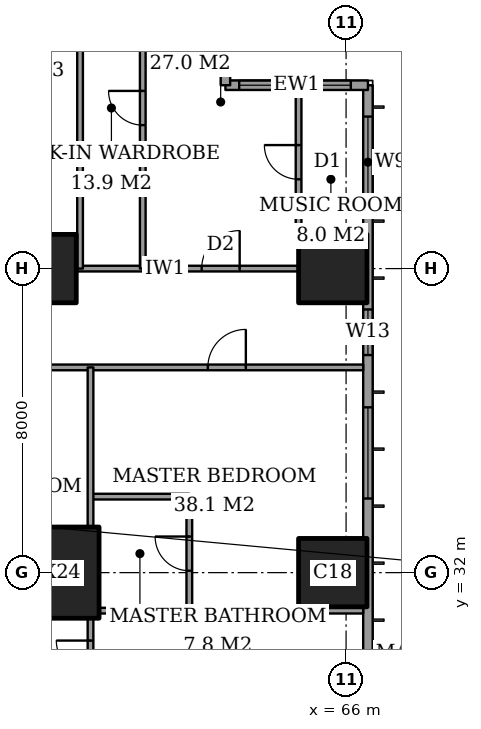
"""IFC4 building model, lengths in metres.
Left out: names, types, materials, properties, quantities, classifications, styles, units other than length and angle.
Written with IfcOpenShell. Run it as: python <this file> out.ifc"""

import sys

from ifc_helpers import new_model, si_unit, direction, frame, frame_2d, origin, origin_2d, place, context, subcontext, project, spatial, rectangle, extrude, element, fill, save


model = new_model("IFC4")
c1 = context("Model", 3, precision=1e-05, world=origin(), true_north=direction((0.0, 1.0)))
c2 = subcontext(c1, "Body", "Model", "MODEL_VIEW")
j1 = project(units=[si_unit("LENGTHUNIT", "METRE"), si_unit("PLANEANGLEUNIT", "RADIAN")], contexts=[c1])
p1 = place(None, origin())
s1 = spatial("IfcSite", under=j1, at=p1, CompositionType="ELEMENT")
p2 = place(p1, origin())
s2 = spatial("IfcBuilding", under=s1, at=p2, CompositionType="ELEMENT")
p3 = place(p2, frame((0.0, 0.0, 185.8)))
s3 = spatial("IfcBuildingStorey", under=s2, at=p3, CompositionType="ELEMENT", Elevation=185.8)
p4 = place(p3, frame((58.0, 32.0, 0.0), z_axis=(0.0, 0.0, 1.0), x_axis=(1.0, 0.0, 0.0)))
e1 = element("IfcColumn", 1, at=p4, inside=s3, PredefinedType="COLUMN", context=c2, shape_type="SweptSolid", body=[
    extrude(rectangle(XDim=3.0, YDim=2.4, at=origin_2d()), origin(), (0.0, 0.0, 1.0), 3.6),
])
for number, where, z_axis, x_axis in (
    (2, (58.0, 40.0, 0.0), (0.0, 0.0, 1.0), (1.0, 0.0, 0.0)),
    (3, (65.65, 32.0, 0.0), (0.0, 0.0, 1.0), (1.0, 0.0, 0.0)),
    (4, (65.65, 40.0, 0.0), (0.0, 0.0, 1.0), (1.0, 0.0, 0.0)),
):
    element("IfcColumn", number, at=place(p3, frame(where, z_axis=z_axis, x_axis=x_axis)), inside=s3, PredefinedType="COLUMN", context=c2, shape_type="SweptSolid", body=[
        extrude(rectangle(XDim=1.8, YDim=1.8, at=origin_2d()), origin(), (0.0, 0.0, 1.0), 3.6),
    ])
p5 = place(p3, frame((66.575, 3.175, 0.0), z_axis=(0.0, 0.0, 1.0), x_axis=(0.0, 1.0, 0.0)))
e5 = element("IfcWall", 5, at=p5, inside=s3, PredefinedType="SOLIDWALL", context=c2, shape_type="SweptSolid", body=[
    extrude(rectangle(XDim=41.65, YDim=0.25, at=frame_2d((20.825, 0.0))), origin(), (0.0, 0.0, 1.0), 3.6),
])
p6 = place(p5, frame((0.825, 0.0, 0.2)))
e6 = element("IfcOpeningElement", 6, at=p6, cuts=e5, PredefinedType="OPENING", context=c2, shape_type="SweptSolid", body=[
    extrude(rectangle(XDim=2.4, YDim=2.4, at=frame_2d((1.2, 1.2))), frame((0.0, 0.135, 0.0), z_axis=(0.0, -1.0, 0.0), x_axis=(1.0, 0.0, 0.0)), (0.0, 0.0, 1.0), 0.27),
])
p7 = place(p5, frame((6.6, 0.0, 0.2)))
e7 = element("IfcOpeningElement", 7, at=p7, cuts=e5, PredefinedType="OPENING", context=c2, shape_type="SweptSolid", body=[
    extrude(rectangle(XDim=1.2, YDim=2.4, at=frame_2d((0.6, 1.2))), frame((0.0, 0.135, 0.0), z_axis=(0.0, -1.0, 0.0), x_axis=(1.0, 0.0, 0.0)), (0.0, 0.0, 1.0), 0.27),
])
p8 = place(p5, frame((8.775, 0.0, 0.2)))
e8 = element("IfcOpeningElement", 8, at=p8, cuts=e5, PredefinedType="OPENING", context=c2, shape_type="SweptSolid", body=[
    extrude(rectangle(XDim=2.4, YDim=2.4, at=frame_2d((1.2, 1.2))), frame((0.0, 0.135, 0.0), z_axis=(0.0, -1.0, 0.0), x_axis=(1.0, 0.0, 0.0)), (0.0, 0.0, 1.0), 0.27),
])
p9 = place(p5, frame((15.675, 0.0, 0.2)))
e9 = element("IfcOpeningElement", 9, at=p9, cuts=e5, PredefinedType="OPENING", context=c2, shape_type="SweptSolid", body=[
    extrude(rectangle(XDim=2.4, YDim=2.4, at=frame_2d((1.2, 1.2))), frame((0.0, 0.135, 0.0), z_axis=(0.0, -1.0, 0.0), x_axis=(1.0, 0.0, 0.0)), (0.0, 0.0, 1.0), 0.27),
])
p10 = place(p5, frame((23.575, 0.0, 0.2)))
e10 = element("IfcOpeningElement", 10, at=p10, cuts=e5, PredefinedType="OPENING", context=c2, shape_type="SweptSolid", body=[
    extrude(rectangle(XDim=2.4, YDim=2.4, at=frame_2d((1.2, 1.2))), frame((0.0, 0.135, 0.0), z_axis=(0.0, -1.0, 0.0), x_axis=(1.0, 0.0, 0.0)), (0.0, 0.0, 1.0), 0.27),
])
p11 = place(p5, frame((30.775, 0.0, 0.2)))
e11 = element("IfcOpeningElement", 11, at=p11, cuts=e5, PredefinedType="OPENING", context=c2, shape_type="SweptSolid", body=[
    extrude(rectangle(XDim=2.4, YDim=2.4, at=frame_2d((1.2, 1.2))), frame((0.0, 0.135, 0.0), z_axis=(0.0, -1.0, 0.0), x_axis=(1.0, 0.0, 0.0)), (0.0, 0.0, 1.0), 0.27),
])
p12 = place(p5, frame((34.55, 0.0, 0.2)))
e12 = element("IfcOpeningElement", 12, at=p12, cuts=e5, PredefinedType="OPENING", context=c2, shape_type="SweptSolid", body=[
    extrude(rectangle(XDim=1.2, YDim=2.4, at=frame_2d((0.6, 1.2))), frame((0.0, 0.135, 0.0), z_axis=(0.0, -1.0, 0.0), x_axis=(1.0, 0.0, 0.0)), (0.0, 0.0, 1.0), 0.27),
])
p13 = place(p5, frame((38.425, 0.0, 0.2)))
e13 = element("IfcOpeningElement", 13, at=p13, cuts=e5, PredefinedType="OPENING", context=c2, shape_type="SweptSolid", body=[
    extrude(rectangle(XDim=2.4, YDim=2.4, at=frame_2d((1.2, 1.2))), frame((0.0, 0.135, 0.0), z_axis=(0.0, -1.0, 0.0), x_axis=(1.0, 0.0, 0.0)), (0.0, 0.0, 1.0), 0.27),
])
p14 = place(p3, frame((66.575, 44.825, 0.0), z_axis=(0.0, 0.0, 1.0), x_axis=(-1.0, 0.0, 0.0)))
e14 = element("IfcWall", 14, at=p14, inside=s3, PredefinedType="SOLIDWALL", context=c2, shape_type="SweptSolid", body=[
    extrude(rectangle(XDim=3.75, YDim=0.25, at=frame_2d((1.875, 0.0))), origin(), (0.0, 0.0, 1.0), 3.6),
])
p15 = place(p14, frame((0.45, 0.0, 0.2)))
e15 = element("IfcOpeningElement", 15, at=p15, cuts=e14, PredefinedType="OPENING", context=c2, shape_type="SweptSolid", body=[
    extrude(rectangle(XDim=1.2, YDim=2.4, at=frame_2d((0.6, 1.2))), frame((0.0, 0.135, 0.0), z_axis=(0.0, -1.0, 0.0), x_axis=(1.0, 0.0, 0.0)), (0.0, 0.0, 1.0), 0.27),
])
p16 = place(p14, frame((2.188, 0.0, 0.2)))
e16 = element("IfcOpeningElement", 16, at=p16, cuts=e14, PredefinedType="OPENING", context=c2, shape_type="SweptSolid", body=[
    extrude(rectangle(XDim=1.2, YDim=2.4, at=frame_2d((0.6, 1.2))), frame((0.0, 0.135, 0.0), z_axis=(0.0, -1.0, 0.0), x_axis=(1.0, 0.0, 0.0)), (0.0, 0.0, 1.0), 0.27),
])
p17 = place(p3, frame((62.825, 44.825, 0.0), z_axis=(0.0, 0.0, 1.0), x_axis=(0.0, 1.0, 0.0)))
e17 = element("IfcWall", 17, at=p17, inside=s3, PredefinedType="SOLIDWALL", context=c2, shape_type="SweptSolid", body=[
    extrude(rectangle(XDim=3.75, YDim=0.25, at=frame_2d((1.875, 0.0))), origin(), (0.0, 0.0, 1.0), 3.6),
])
p18 = place(p17, frame((0.613, 0.0, 0.2)))
e18 = element("IfcOpeningElement", 18, at=p18, cuts=e17, PredefinedType="OPENING", context=c2, shape_type="SweptSolid", body=[
    extrude(rectangle(XDim=2.4, YDim=2.4, at=frame_2d((1.2, 1.2))), frame((0.0, 0.135, 0.0), z_axis=(0.0, -1.0, 0.0), x_axis=(1.0, 0.0, 0.0)), (0.0, 0.0, 1.0), 0.27),
])
p19 = place(p3, frame((59.5, 31.0, 0.0), z_axis=(0.0, 0.0, 1.0), x_axis=(1.0, 0.0, 0.0)))
e19 = element("IfcWall", 19, at=p19, inside=s3, PredefinedType="PARTITIONING", context=c2, shape_type="SweptSolid", body=[
    extrude(rectangle(XDim=6.95, YDim=0.15, at=frame_2d((3.475, 0.0))), origin(), (0.0, 0.0, 1.0), 3.35),
])
p20 = place(p3, frame((59.275, 34.0, 0.0), z_axis=(0.0, 0.0, 1.0), x_axis=(1.0, 0.0, 0.0)))
e20 = element("IfcWall", 20, at=p20, inside=s3, PredefinedType="PARTITIONING", context=c2, shape_type="SweptSolid", body=[
    extrude(rectangle(XDim=2.6, YDim=0.15, at=frame_2d((1.3, 0.0))), origin(), (0.0, 0.0, 1.0), 3.35),
])
p21 = place(p3, frame((41.439, 37.4, 0.0), z_axis=(0.0, 0.0, 1.0), x_axis=(1.0, 0.0, 0.0)))
e21 = element("IfcWall", 21, at=p21, inside=s3, PredefinedType="PARTITIONING", context=c2, shape_type="SweptSolid", body=[
    extrude(rectangle(XDim=25.011, YDim=0.15, at=frame_2d((12.505, 0.0))), origin(), (0.0, 0.0, 1.0), 3.35),
])
p22 = place(p21, frame((10.761, 0.0, 0.0)))
e22 = element("IfcOpeningElement", 22, at=p22, cuts=e21, PredefinedType="OPENING", context=c2, shape_type="SweptSolid", body=[
    extrude(rectangle(XDim=1.0, YDim=2.1, at=frame_2d((0.5, 1.05))), frame((0.0, 0.085, 0.0), z_axis=(0.0, -1.0, 0.0), x_axis=(1.0, 0.0, 0.0)), (0.0, 0.0, 1.0), 0.17),
])
p23 = place(p21, frame((20.924, 0.0, 0.0)))
e23 = element("IfcOpeningElement", 23, at=p23, cuts=e21, PredefinedType="OPENING", context=c2, shape_type="SweptSolid", body=[
    extrude(rectangle(XDim=1.0, YDim=2.1, at=frame_2d((0.5, 1.05))), frame((0.0, 0.085, 0.0), z_axis=(0.0, -1.0, 0.0), x_axis=(1.0, 0.0, 0.0)), (0.0, 0.0, 1.0), 0.17),
])
p24 = place(p21, frame((15.749, 0.0, 0.0)))
e24 = element("IfcOpeningElement", 24, at=p24, cuts=e21, PredefinedType="OPENING", context=c2, shape_type="SweptSolid", body=[
    extrude(rectangle(XDim=0.9, YDim=2.1, at=frame_2d((0.45, 1.05))), frame((0.0, 0.085, 0.0), z_axis=(0.0, -1.0, 0.0), x_axis=(1.0, 0.0, 0.0)), (0.0, 0.0, 1.0), 0.17),
])
p25 = place(p21, frame((12.961, 0.0, 0.0)))
e25 = element("IfcOpeningElement", 25, at=p25, cuts=e21, PredefinedType="OPENING", context=c2, shape_type="SweptSolid", body=[
    extrude(rectangle(XDim=1.0, YDim=2.1, at=frame_2d((0.5, 1.05))), frame((0.0, 0.085, 0.0), z_axis=(0.0, -1.0, 0.0), x_axis=(1.0, 0.0, 0.0)), (0.0, 0.0, 1.0), 0.17),
])
p26 = place(p21, frame((7.911, 0.0, 0.0)))
e26 = element("IfcOpeningElement", 26, at=p26, cuts=e21, PredefinedType="OPENING", context=c2, shape_type="SweptSolid", body=[
    extrude(rectangle(XDim=0.9, YDim=2.1, at=frame_2d((0.45, 1.05))), frame((0.0, 0.085, 0.0), z_axis=(0.0, -1.0, 0.0), x_axis=(1.0, 0.0, 0.0)), (0.0, 0.0, 1.0), 0.17),
])
p27 = place(p21, frame((2.836, 0.0, 0.0)))
e27 = element("IfcOpeningElement", 27, at=p27, cuts=e21, PredefinedType="OPENING", context=c2, shape_type="SweptSolid", body=[
    extrude(rectangle(XDim=1.0, YDim=2.1, at=frame_2d((0.5, 1.05))), frame((0.0, 0.085, 0.0), z_axis=(0.0, -1.0, 0.0), x_axis=(1.0, 0.0, 0.0)), (0.0, 0.0, 1.0), 0.17),
])
p28 = place(p3, frame((58.9, 40.0, 0.0), z_axis=(0.0, 0.0, 1.0), x_axis=(1.0, 0.0, 0.0)))
e28 = element("IfcWall", 28, at=p28, inside=s3, PredefinedType="PARTITIONING", context=c2, shape_type="SweptSolid", body=[
    extrude(rectangle(XDim=5.85, YDim=0.15, at=frame_2d((2.925, 0.0))), origin(), (0.0, 0.0, 1.0), 3.35),
])
p29 = place(p28, frame((3.3, 0.0, 0.0)))
e29 = element("IfcOpeningElement", 29, at=p29, cuts=e28, PredefinedType="OPENING", context=c2, shape_type="SweptSolid", body=[
    extrude(rectangle(XDim=1.0, YDim=2.1, at=frame_2d((0.5, 1.05))), frame((0.0, 0.085, 0.0), z_axis=(0.0, -1.0, 0.0), x_axis=(1.0, 0.0, 0.0)), (0.0, 0.0, 1.0), 0.17),
])
p30 = place(p3, frame((59.0, 40.0, 0.0), z_axis=(0.0, 0.0, 1.0), x_axis=(0.0, 1.0, 0.0)))
e30 = element("IfcWall", 30, at=p30, inside=s3, PredefinedType="PARTITIONING", context=c2, shape_type="SweptSolid", body=[
    extrude(rectangle(XDim=8.45, YDim=0.15, at=frame_2d((4.225, 0.0))), origin(), (0.0, 0.0, 1.0), 3.35),
])
p31 = place(p3, frame((59.275, 28.35, 0.0), z_axis=(0.0, 0.0, 1.0), x_axis=(0.0, 1.0, 0.0)))
e31 = element("IfcWall", 31, at=p31, inside=s3, PredefinedType="PARTITIONING", context=c2, shape_type="SweptSolid", body=[
    extrude(rectangle(XDim=2.45, YDim=0.15, at=frame_2d((1.225, 0.0))), origin(), (0.0, 0.0, 1.0), 3.35),
])
p32 = place(p31, frame((0.962, 0.0, 0.0)))
e32 = element("IfcOpeningElement", 32, at=p32, cuts=e31, PredefinedType="OPENING", context=c2, shape_type="SweptSolid", body=[
    extrude(rectangle(XDim=0.9, YDim=2.1, at=frame_2d((0.45, 1.05))), frame((0.0, 0.085, 0.0), z_axis=(0.0, -1.0, 0.0), x_axis=(1.0, 0.0, 0.0)), (0.0, 0.0, 1.0), 0.17),
])
p33 = place(p3, frame((59.275, 33.2, 0.0), z_axis=(0.0, 0.0, 1.0), x_axis=(0.0, 1.0, 0.0)))
e33 = element("IfcWall", 33, at=p33, inside=s3, PredefinedType="PARTITIONING", context=c2, shape_type="SweptSolid", body=[
    extrude(rectangle(XDim=4.2, YDim=0.15, at=frame_2d((2.1, 0.0))), origin(), (0.0, 0.0, 1.0), 3.35),
])
p34 = place(p3, frame((60.65, 40.0, 0.0), z_axis=(0.0, 0.0, 1.0), x_axis=(0.0, 1.0, 0.0)))
e34 = element("IfcWall", 34, at=p34, inside=s3, PredefinedType="PARTITIONING", context=c2, shape_type="SweptSolid", body=[
    extrude(rectangle(XDim=8.45, YDim=0.15, at=frame_2d((4.225, 0.0))), origin(), (0.0, 0.0, 1.0), 3.35),
])
p35 = place(p34, frame((3.775, 0.0, 0.0)))
e35 = element("IfcOpeningElement", 35, at=p35, cuts=e34, PredefinedType="OPENING", context=c2, shape_type="SweptSolid", body=[
    extrude(rectangle(XDim=0.9, YDim=2.1, at=frame_2d((0.45, 1.05))), frame((0.0, 0.085, 0.0), z_axis=(0.0, -1.0, 0.0), x_axis=(1.0, 0.0, 0.0)), (0.0, 0.0, 1.0), 0.17),
])
p36 = place(p3, frame((61.875, 31.0, 0.0), z_axis=(0.0, 0.0, 1.0), x_axis=(0.0, 1.0, 0.0)))
e36 = element("IfcWall", 36, at=p36, inside=s3, PredefinedType="PARTITIONING", context=c2, shape_type="SweptSolid", body=[
    extrude(rectangle(XDim=3.0, YDim=0.15, at=frame_2d((1.5, 0.0))), origin(), (0.0, 0.0, 1.0), 3.35),
])
p37 = place(p36, frame((1.05, 0.0, 0.0)))
e37 = element("IfcOpeningElement", 37, at=p37, cuts=e36, PredefinedType="OPENING", context=c2, shape_type="SweptSolid", body=[
    extrude(rectangle(XDim=0.9, YDim=2.1, at=frame_2d((0.45, 1.05))), frame((0.0, 0.085, 0.0), z_axis=(0.0, -1.0, 0.0), x_axis=(1.0, 0.0, 0.0)), (0.0, 0.0, 1.0), 0.17),
])
p38 = place(p3, frame((64.75, 40.9, 0.0), z_axis=(0.0, 0.0, 1.0), x_axis=(0.0, 1.0, 0.0)))
e38 = element("IfcWall", 38, at=p38, inside=s3, PredefinedType="PARTITIONING", context=c2, shape_type="SweptSolid", body=[
    extrude(rectangle(XDim=3.8, YDim=0.15, at=frame_2d((1.9, 0.0))), origin(), (0.0, 0.0, 1.0), 3.35),
])
p39 = place(p38, frame((1.45, 0.0, 0.0)))
e39 = element("IfcOpeningElement", 39, at=p39, cuts=e38, PredefinedType="OPENING", context=c2, shape_type="SweptSolid", body=[
    extrude(rectangle(XDim=0.9, YDim=2.1, at=frame_2d((0.45, 1.05))), frame((0.0, 0.085, 0.0), z_axis=(0.0, -1.0, 0.0), x_axis=(1.0, 0.0, 0.0)), (0.0, 0.0, 1.0), 0.17),
])
p40 = place(p11, origin())
e40 = element("IfcWindow", 40, at=p40, inside=s3, PartitioningType="SINGLE_PANEL", PredefinedType="WINDOW", context=c2, shape_type="SweptSolid", body=[
    extrude(rectangle(XDim=2.4, YDim=2.4, at=frame_2d((1.2, 1.2))), frame((0.0, 0.03, 0.0), z_axis=(0.0, -1.0, 0.0), x_axis=(1.0, 0.0, 0.0)), (0.0, 0.0, 1.0), 0.06),
])
fill(e11, e40)
p41 = place(p12, origin())
e41 = element("IfcWindow", 41, at=p41, inside=s3, PartitioningType="SINGLE_PANEL", PredefinedType="WINDOW", context=c2, shape_type="SweptSolid", body=[
    extrude(rectangle(XDim=1.2, YDim=2.4, at=frame_2d((0.6, 1.2))), frame((0.0, 0.03, 0.0), z_axis=(0.0, -1.0, 0.0), x_axis=(1.0, 0.0, 0.0)), (0.0, 0.0, 1.0), 0.06),
])
fill(e12, e41)
p42 = place(p13, origin())
e42 = element("IfcWindow", 42, at=p42, inside=s3, PartitioningType="SINGLE_PANEL", PredefinedType="WINDOW", context=c2, shape_type="SweptSolid", body=[
    extrude(rectangle(XDim=2.4, YDim=2.4, at=frame_2d((1.2, 1.2))), frame((0.0, 0.03, 0.0), z_axis=(0.0, -1.0, 0.0), x_axis=(1.0, 0.0, 0.0)), (0.0, 0.0, 1.0), 0.06),
])
fill(e13, e42)
p43 = place(p15, origin())
e43 = element("IfcWindow", 43, at=p43, inside=s3, PartitioningType="SINGLE_PANEL", PredefinedType="WINDOW", context=c2, shape_type="SweptSolid", body=[
    extrude(rectangle(XDim=1.2, YDim=2.4, at=frame_2d((0.6, 1.2))), frame((0.0, 0.03, 0.0), z_axis=(0.0, -1.0, 0.0), x_axis=(1.0, 0.0, 0.0)), (0.0, 0.0, 1.0), 0.06),
])
fill(e15, e43)
p44 = place(p16, origin())
e44 = element("IfcWindow", 44, at=p44, inside=s3, PartitioningType="SINGLE_PANEL", PredefinedType="WINDOW", context=c2, shape_type="SweptSolid", body=[
    extrude(rectangle(XDim=1.2, YDim=2.4, at=frame_2d((0.6, 1.2))), frame((0.0, 0.03, 0.0), z_axis=(0.0, -1.0, 0.0), x_axis=(1.0, 0.0, 0.0)), (0.0, 0.0, 1.0), 0.06),
])
fill(e16, e44)
p45 = place(p18, origin())
e45 = element("IfcWindow", 45, at=p45, inside=s3, PartitioningType="SINGLE_PANEL", PredefinedType="WINDOW", context=c2, shape_type="SweptSolid", body=[
    extrude(rectangle(XDim=2.4, YDim=2.4, at=frame_2d((1.2, 1.2))), frame((0.0, 0.03, 0.0), z_axis=(0.0, -1.0, 0.0), x_axis=(1.0, 0.0, 0.0)), (0.0, 0.0, 1.0), 0.06),
])
fill(e18, e45)
p46 = place(p39, origin())
e46 = element("IfcDoor", 46, at=p46, inside=s3, OperationType="SINGLE_SWING_LEFT", PredefinedType="DOOR", context=c2, shape_type="SweptSolid", body=[
    extrude(rectangle(XDim=0.9, YDim=2.1, at=frame_2d((0.45, 1.05))), frame((0.0, 0.025, 0.0), z_axis=(0.0, -1.0, 0.0), x_axis=(1.0, 0.0, 0.0)), (0.0, 0.0, 1.0), 0.05),
])
fill(e39, e46)
p47 = place(p29, origin())
e47 = element("IfcDoor", 47, at=p47, inside=s3, OperationType="SINGLE_SWING_LEFT", PredefinedType="DOOR", context=c2, shape_type="SweptSolid", body=[
    extrude(rectangle(XDim=1.0, YDim=2.1, at=frame_2d((0.5, 1.05))), frame((0.0, 0.025, 0.0), z_axis=(0.0, -1.0, 0.0), x_axis=(1.0, 0.0, 0.0)), (0.0, 0.0, 1.0), 0.05),
])
fill(e29, e47)
p48 = place(p35, origin())
e48 = element("IfcDoor", 48, at=p48, inside=s3, OperationType="SINGLE_SWING_LEFT", PredefinedType="DOOR", context=c2, shape_type="SweptSolid", body=[
    extrude(rectangle(XDim=0.9, YDim=2.1, at=frame_2d((0.45, 1.05))), frame((0.0, 0.025, 0.0), z_axis=(0.0, -1.0, 0.0), x_axis=(1.0, 0.0, 0.0)), (0.0, 0.0, 1.0), 0.05),
])
fill(e35, e48)
p49 = place(p37, origin())
e49 = element("IfcDoor", 49, at=p49, inside=s3, OperationType="SINGLE_SWING_LEFT", PredefinedType="DOOR", context=c2, shape_type="SweptSolid", body=[
    extrude(rectangle(XDim=0.9, YDim=2.1, at=frame_2d((0.45, 1.05))), frame((0.0, 0.025, 0.0), z_axis=(0.0, -1.0, 0.0), x_axis=(1.0, 0.0, 0.0)), (0.0, 0.0, 1.0), 0.05),
])
fill(e37, e49)
p50 = place(p23, origin())
e50 = element("IfcDoor", 50, at=p50, inside=s3, OperationType="SINGLE_SWING_LEFT", PredefinedType="DOOR", context=c2, shape_type="SweptSolid", body=[
    extrude(rectangle(XDim=1.0, YDim=2.1, at=frame_2d((0.5, 1.05))), frame((0.0, 0.025, 0.0), z_axis=(0.0, -1.0, 0.0), x_axis=(1.0, 0.0, 0.0)), (0.0, 0.0, 1.0), 0.05),
])
fill(e23, e50)
p51 = place(p32, origin())
e51 = element("IfcDoor", 51, at=p51, inside=s3, OperationType="SINGLE_SWING_LEFT", PredefinedType="DOOR", context=c2, shape_type="SweptSolid", body=[
    extrude(rectangle(XDim=0.9, YDim=2.1, at=frame_2d((0.45, 1.05))), frame((0.0, 0.025, 0.0), z_axis=(0.0, -1.0, 0.0), x_axis=(1.0, 0.0, 0.0)), (0.0, 0.0, 1.0), 0.05),
])
fill(e32, e51)
save(model, sys.argv[1])
